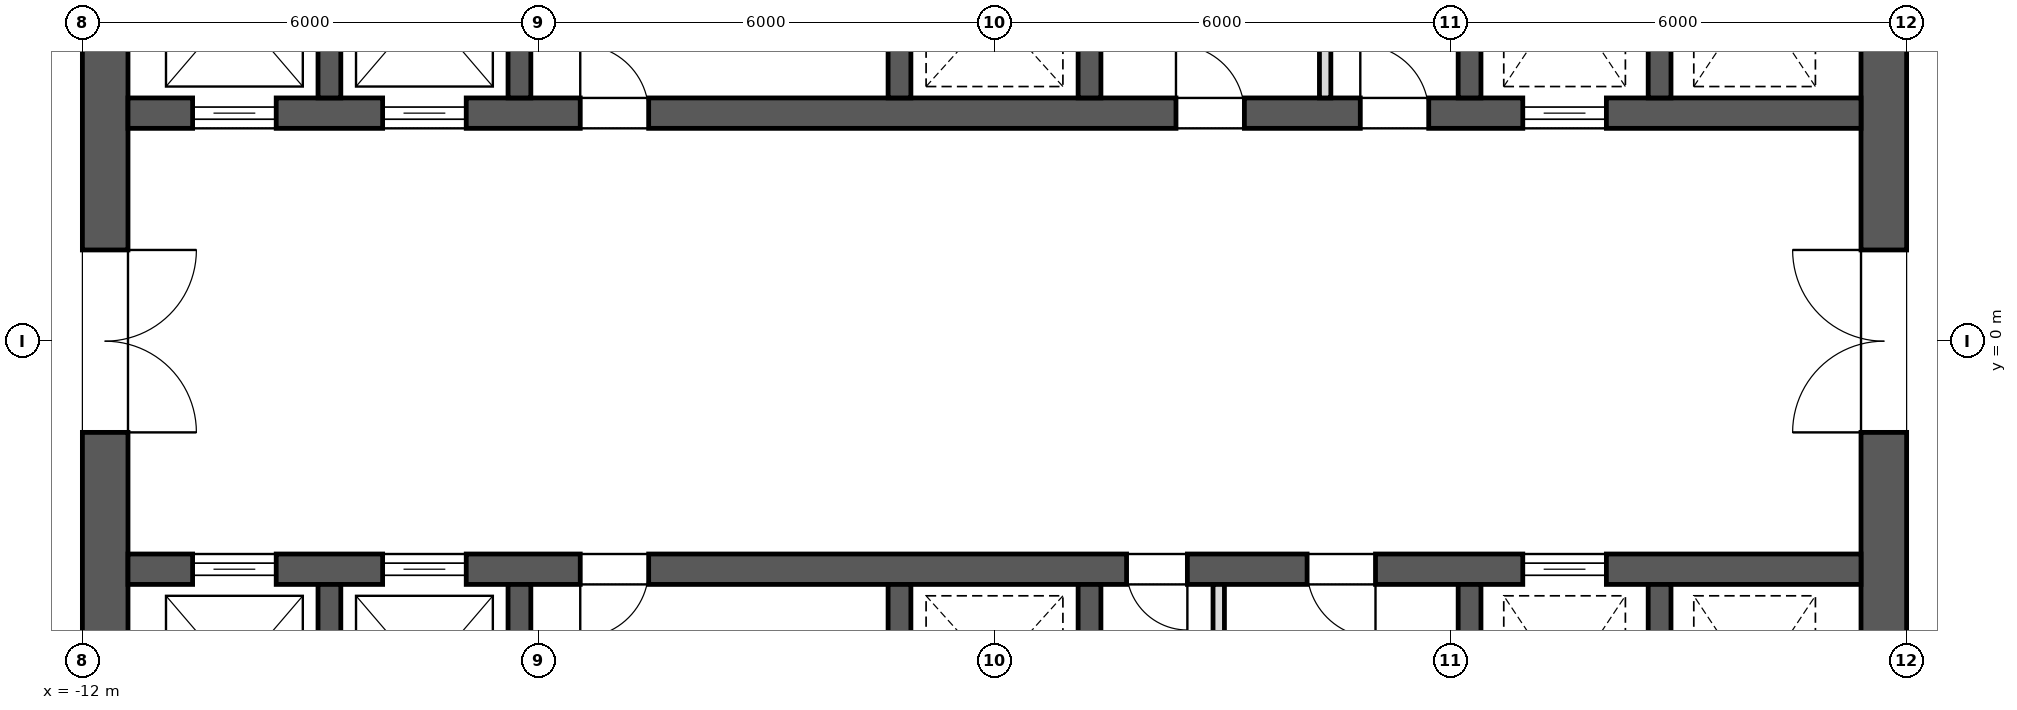
"""IFC4 building model, lengths in metres.
Left out: names, types, materials, properties, quantities, classifications, styles, units other than length and angle.
Written with IfcOpenShell. Run it as: python <this file> out.ifc"""

import sys

from ifc_helpers import new_model, si_unit, direction, frame, frame_2d, origin, place, context, subcontext, project, spatial, rectangle, extrude, element, fill, save


model = new_model("IFC4")
c1 = context("Model", 3, precision=1e-05, world=origin(), true_north=direction((0.0, 1.0)))
c2 = subcontext(c1, "Body", "Model", "MODEL_VIEW")
j1 = project(units=[si_unit("LENGTHUNIT", "METRE"), si_unit("PLANEANGLEUNIT", "RADIAN")], contexts=[c1])
p1 = place(None, origin())
s1 = spatial("IfcSite", under=j1, at=p1, CompositionType="ELEMENT")
p2 = place(p1, origin())
s2 = spatial("IfcBuilding", under=s1, at=p2, CompositionType="ELEMENT")
p3 = place(p2, frame((0.0, 0.0, 300.3)))
s3 = spatial("IfcBuildingStorey", under=s2, at=p3, CompositionType="ELEMENT", Elevation=300.3)
p4 = place(p3, frame((11.7, -11.4, 0.0), z_axis=(0.0, 0.0, 1.0), x_axis=(0.0, 1.0, 0.0)))
e1 = element("IfcWall", 1, at=p4, inside=s3, PredefinedType="SHEAR", context=c2, shape_type="SweptSolid", body=[
    extrude(rectangle(XDim=22.8, YDim=0.6, at=frame_2d((11.4, 0.0))), origin(), (0.0, 0.0, 1.0), 4.0),
])
p5 = place(p4, frame((10.2, 0.0, 0.0)))
e2 = element("IfcOpeningElement", 2, at=p5, cuts=e1, PredefinedType="OPENING", context=c2, shape_type="SweptSolid", body=[
    extrude(rectangle(XDim=2.4, YDim=2.1, at=frame_2d((1.2, 1.05))), frame((0.0, 0.312, 0.0), z_axis=(0.0, -1.0, 0.0), x_axis=(1.0, 0.0, 0.0)), (0.0, 0.0, 1.0), 0.624),
])
p6 = place(p4, frame((19.5, 0.0, 0.0)))
e3 = element("IfcOpeningElement", 3, at=p6, cuts=e1, PredefinedType="OPENING", context=c2, shape_type="SweptSolid", body=[
    extrude(rectangle(XDim=1.2, YDim=2.1, at=frame_2d((0.6, 1.05))), frame((0.0, 0.312, 0.0), z_axis=(0.0, -1.0, 0.0), x_axis=(1.0, 0.0, 0.0)), (0.0, 0.0, 1.0), 0.624),
])
p7 = place(p4, frame((2.1, 0.0, 0.0)))
e4 = element("IfcOpeningElement", 4, at=p7, cuts=e1, PredefinedType="OPENING", context=c2, shape_type="SweptSolid", body=[
    extrude(rectangle(XDim=1.2, YDim=2.1, at=frame_2d((0.6, 1.05))), frame((0.0, 0.312, 0.0), z_axis=(0.0, -1.0, 0.0), x_axis=(1.0, 0.0, 0.0)), (0.0, 0.0, 1.0), 0.624),
])
p8 = place(p3, frame((-11.7, -11.4, 0.0), z_axis=(0.0, 0.0, 1.0), x_axis=(0.0, 1.0, 0.0)))
e5 = element("IfcWall", 5, at=p8, inside=s3, PredefinedType="SHEAR", context=c2, shape_type="SweptSolid", body=[
    extrude(rectangle(XDim=22.8, YDim=0.6, at=frame_2d((11.4, 0.0))), origin(), (0.0, 0.0, 1.0), 4.0),
])
p9 = place(p8, frame((10.2, 0.0, 0.0)))
e6 = element("IfcOpeningElement", 6, at=p9, cuts=e5, PredefinedType="OPENING", context=c2, shape_type="SweptSolid", body=[
    extrude(rectangle(XDim=2.4, YDim=2.1, at=frame_2d((1.2, 1.05))), frame((0.0, 0.312, 0.0), z_axis=(0.0, -1.0, 0.0), x_axis=(1.0, 0.0, 0.0)), (0.0, 0.0, 1.0), 0.624),
])
p10 = place(p8, frame((18.925, 0.0, 0.0)))
e7 = element("IfcOpeningElement", 7, at=p10, cuts=e5, PredefinedType="OPENING", context=c2, shape_type="SweptSolid", body=[
    extrude(rectangle(XDim=1.2, YDim=2.1, at=frame_2d((0.6, 1.05))), frame((0.0, 0.312, 0.0), z_axis=(0.0, -1.0, 0.0), x_axis=(1.0, 0.0, 0.0)), (0.0, 0.0, 1.0), 0.624),
])
p11 = place(p8, frame((2.675, 0.0, 0.0)))
e8 = element("IfcOpeningElement", 8, at=p11, cuts=e5, PredefinedType="OPENING", context=c2, shape_type="SweptSolid", body=[
    extrude(rectangle(XDim=1.2, YDim=2.1, at=frame_2d((0.6, 1.05))), frame((0.0, 0.312, 0.0), z_axis=(0.0, -1.0, 0.0), x_axis=(1.0, 0.0, 0.0)), (0.0, 0.0, 1.0), 0.624),
])
p12 = place(p3, frame((-11.4, 3.0, 0.0), z_axis=(0.0, 0.0, 1.0), x_axis=(1.0, 0.0, 0.0)))
e9 = element("IfcWall", 9, at=p12, inside=s3, PredefinedType="SHEAR", context=c2, shape_type="SweptSolid", body=[
    extrude(rectangle(XDim=22.8, YDim=0.4, at=frame_2d((11.4, 0.0))), origin(), (0.0, 0.0, 1.0), 4.0),
])
p13 = place(p12, frame((0.85, 0.0, 0.0)))
e10 = element("IfcOpeningElement", 10, at=p13, cuts=e9, PredefinedType="OPENING", context=c2, shape_type="SweptSolid", body=[
    extrude(rectangle(XDim=1.1, YDim=2.1, at=frame_2d((0.55, 1.05))), frame((0.0, 0.212, 0.0), z_axis=(0.0, -1.0, 0.0), x_axis=(1.0, 0.0, 0.0)), (0.0, 0.0, 1.0), 0.424),
])
p14 = place(p12, frame((3.35, 0.0, 0.0)))
e11 = element("IfcOpeningElement", 11, at=p14, cuts=e9, PredefinedType="OPENING", context=c2, shape_type="SweptSolid", body=[
    extrude(rectangle(XDim=1.1, YDim=2.1, at=frame_2d((0.55, 1.05))), frame((0.0, 0.212, 0.0), z_axis=(0.0, -1.0, 0.0), x_axis=(1.0, 0.0, 0.0)), (0.0, 0.0, 1.0), 0.424),
])
p15 = place(p12, frame((18.35, 0.0, 0.0)))
e12 = element("IfcOpeningElement", 12, at=p15, cuts=e9, PredefinedType="OPENING", context=c2, shape_type="SweptSolid", body=[
    extrude(rectangle(XDim=1.1, YDim=2.1, at=frame_2d((0.55, 1.05))), frame((0.0, 0.212, 0.0), z_axis=(0.0, -1.0, 0.0), x_axis=(1.0, 0.0, 0.0)), (0.0, 0.0, 1.0), 0.424),
])
p16 = place(p12, frame((13.788, 0.0, 0.0)))
e13 = element("IfcOpeningElement", 13, at=p16, cuts=e9, PredefinedType="OPENING", context=c2, shape_type="SweptSolid", body=[
    extrude(rectangle(XDim=0.9, YDim=2.1, at=frame_2d((0.45, 1.05))), frame((0.0, 0.212, 0.0), z_axis=(0.0, -1.0, 0.0), x_axis=(1.0, 0.0, 0.0)), (0.0, 0.0, 1.0), 0.424),
])
p17 = place(p12, frame((16.212, 0.0, 0.0)))
e14 = element("IfcOpeningElement", 14, at=p17, cuts=e9, PredefinedType="OPENING", context=c2, shape_type="SweptSolid", body=[
    extrude(rectangle(XDim=0.9, YDim=2.1, at=frame_2d((0.45, 1.05))), frame((0.0, 0.212, 0.0), z_axis=(0.0, -1.0, 0.0), x_axis=(1.0, 0.0, 0.0)), (0.0, 0.0, 1.0), 0.424),
])
p18 = place(p12, frame((5.95, 0.0, 0.0)))
e15 = element("IfcOpeningElement", 15, at=p18, cuts=e9, PredefinedType="OPENING", context=c2, shape_type="SweptSolid", body=[
    extrude(rectangle(XDim=0.9, YDim=2.1, at=frame_2d((0.45, 1.05))), frame((0.0, 0.212, 0.0), z_axis=(0.0, -1.0, 0.0), x_axis=(1.0, 0.0, 0.0)), (0.0, 0.0, 1.0), 0.424),
])
for number, where, z_axis, x_axis in (
    (16, (-8.75, 3.2, 0.0), (0.0, 0.0, 1.0), (0.0, 1.0, 0.0)),
    (17, (-6.25, 3.2, 0.0), (0.0, 0.0, 1.0), (0.0, 1.0, 0.0)),
    (18, (-1.25, 3.2, 0.0), (0.0, 0.0, 1.0), (0.0, 1.0, 0.0)),
    (19, (1.25, 3.2, 0.0), (0.0, 0.0, 1.0), (0.0, 1.0, 0.0)),
    (20, (6.25, 3.2, 0.0), (0.0, 0.0, 1.0), (0.0, 1.0, 0.0)),
    (21, (8.75, 3.2, 0.0), (0.0, 0.0, 1.0), (0.0, 1.0, 0.0)),
):
    element("IfcWall", number, at=place(p3, frame(where, z_axis=z_axis, x_axis=x_axis)), inside=s3, PredefinedType="SHEAR", context=c2, shape_type="SweptSolid", body=[
        extrude(rectangle(XDim=2.9, YDim=0.3, at=frame_2d((1.45, 0.0))), origin(), (0.0, 0.0, 1.0), 4.0),
    ])
p19 = place(p3, frame((-11.4, -3.0, 0.0), z_axis=(0.0, 0.0, 1.0), x_axis=(1.0, 0.0, 0.0)))
e22 = element("IfcWall", 22, at=p19, inside=s3, PredefinedType="SHEAR", context=c2, shape_type="SweptSolid", body=[
    extrude(rectangle(XDim=22.8, YDim=0.4, at=frame_2d((11.4, 0.0))), origin(), (0.0, 0.0, 1.0), 4.0),
])
p20 = place(p19, frame((0.85, 0.0, 0.0)))
e23 = element("IfcOpeningElement", 23, at=p20, cuts=e22, PredefinedType="OPENING", context=c2, shape_type="SweptSolid", body=[
    extrude(rectangle(XDim=1.1, YDim=2.1, at=frame_2d((0.55, 1.05))), frame((0.0, 0.212, 0.0), z_axis=(0.0, -1.0, 0.0), x_axis=(1.0, 0.0, 0.0)), (0.0, 0.0, 1.0), 0.424),
])
p21 = place(p19, frame((3.35, 0.0, 0.0)))
e24 = element("IfcOpeningElement", 24, at=p21, cuts=e22, PredefinedType="OPENING", context=c2, shape_type="SweptSolid", body=[
    extrude(rectangle(XDim=1.1, YDim=2.1, at=frame_2d((0.55, 1.05))), frame((0.0, 0.212, 0.0), z_axis=(0.0, -1.0, 0.0), x_axis=(1.0, 0.0, 0.0)), (0.0, 0.0, 1.0), 0.424),
])
p22 = place(p19, frame((18.35, 0.0, 0.0)))
e25 = element("IfcOpeningElement", 25, at=p22, cuts=e22, PredefinedType="OPENING", context=c2, shape_type="SweptSolid", body=[
    extrude(rectangle(XDim=1.1, YDim=2.1, at=frame_2d((0.55, 1.05))), frame((0.0, 0.212, 0.0), z_axis=(0.0, -1.0, 0.0), x_axis=(1.0, 0.0, 0.0)), (0.0, 0.0, 1.0), 0.424),
])
p23 = place(p19, frame((13.137, 0.0, 0.0)))
e26 = element("IfcOpeningElement", 26, at=p23, cuts=e22, PredefinedType="OPENING", context=c2, shape_type="SweptSolid", body=[
    extrude(rectangle(XDim=0.8, YDim=2.1, at=frame_2d((0.4, 1.05))), frame((0.0, 0.212, 0.0), z_axis=(0.0, -1.0, 0.0), x_axis=(1.0, 0.0, 0.0)), (0.0, 0.0, 1.0), 0.424),
])
p24 = place(p19, frame((15.512, 0.0, 0.0)))
e27 = element("IfcOpeningElement", 27, at=p24, cuts=e22, PredefinedType="OPENING", context=c2, shape_type="SweptSolid", body=[
    extrude(rectangle(XDim=0.9, YDim=2.1, at=frame_2d((0.45, 1.05))), frame((0.0, 0.212, 0.0), z_axis=(0.0, -1.0, 0.0), x_axis=(1.0, 0.0, 0.0)), (0.0, 0.0, 1.0), 0.424),
])
p25 = place(p19, frame((5.95, 0.0, 0.0)))
e28 = element("IfcOpeningElement", 28, at=p25, cuts=e22, PredefinedType="OPENING", context=c2, shape_type="SweptSolid", body=[
    extrude(rectangle(XDim=0.9, YDim=2.1, at=frame_2d((0.45, 1.05))), frame((0.0, 0.212, 0.0), z_axis=(0.0, -1.0, 0.0), x_axis=(1.0, 0.0, 0.0)), (0.0, 0.0, 1.0), 0.424),
])
for number, where, z_axis, x_axis in (
    (29, (-8.75, -6.1, 0.0), (0.0, 0.0, 1.0), (0.0, 1.0, 0.0)),
    (30, (-6.25, -6.1, 0.0), (0.0, 0.0, 1.0), (0.0, 1.0, 0.0)),
    (31, (-1.25, -6.1, 0.0), (0.0, 0.0, 1.0), (0.0, 1.0, 0.0)),
    (32, (1.25, -6.1, 0.0), (0.0, 0.0, 1.0), (0.0, 1.0, 0.0)),
    (33, (6.25, -6.1, 0.0), (0.0, 0.0, 1.0), (0.0, 1.0, 0.0)),
    (34, (8.75, -6.1, 0.0), (0.0, 0.0, 1.0), (0.0, 1.0, 0.0)),
):
    element("IfcWall", number, at=place(p3, frame(where, z_axis=z_axis, x_axis=x_axis)), inside=s3, PredefinedType="SHEAR", context=c2, shape_type="SweptSolid", body=[
        extrude(rectangle(XDim=2.9, YDim=0.3, at=frame_2d((1.45, 0.0))), origin(), (0.0, 0.0, 1.0), 4.0),
    ])
for number, where, z_axis, x_axis in (
    (35, (4.35, 3.2, 0.0), (0.0, 0.0, 1.0), (0.0, 1.0, 0.0)),
    (36, (2.95, -6.1, 0.0), (0.0, 0.0, 1.0), (0.0, 1.0, 0.0)),
):
    element("IfcWall", number, at=place(p3, frame(where, z_axis=z_axis, x_axis=x_axis)), inside=s3, PredefinedType="PARTITIONING", context=c2, shape_type="SweptSolid", body=[
        extrude(rectangle(XDim=2.9, YDim=0.15, at=frame_2d((1.45, 0.0))), origin(), (0.0, 0.0, 1.0), 3.7),
    ])
p26 = place(p13, origin())
e37 = element("IfcDoor", 37, at=p26, inside=s3, OperationType="SLIDING_TO_LEFT", PredefinedType="DOOR", context=c2, shape_type="SweptSolid", body=[
    extrude(rectangle(XDim=1.1, YDim=2.1, at=frame_2d((0.55, 1.05))), frame((0.0, 0.025, 0.0), z_axis=(0.0, -1.0, 0.0), x_axis=(1.0, 0.0, 0.0)), (0.0, 0.0, 1.0), 0.05),
])
fill(e10, e37)
p27 = place(p14, origin())
e38 = element("IfcDoor", 38, at=p27, inside=s3, OperationType="SLIDING_TO_LEFT", PredefinedType="DOOR", context=c2, shape_type="SweptSolid", body=[
    extrude(rectangle(XDim=1.1, YDim=2.1, at=frame_2d((0.55, 1.05))), frame((0.0, 0.025, 0.0), z_axis=(0.0, -1.0, 0.0), x_axis=(1.0, 0.0, 0.0)), (0.0, 0.0, 1.0), 0.05),
])
fill(e11, e38)
p28 = place(p20, origin())
e39 = element("IfcDoor", 39, at=p28, inside=s3, OperationType="SLIDING_TO_LEFT", PredefinedType="DOOR", context=c2, shape_type="SweptSolid", body=[
    extrude(rectangle(XDim=1.1, YDim=2.1, at=frame_2d((0.55, 1.05))), frame((0.0, 0.025, 0.0), z_axis=(0.0, -1.0, 0.0), x_axis=(1.0, 0.0, 0.0)), (0.0, 0.0, 1.0), 0.05),
])
fill(e23, e39)
p29 = place(p21, origin())
e40 = element("IfcDoor", 40, at=p29, inside=s3, OperationType="SLIDING_TO_LEFT", PredefinedType="DOOR", context=c2, shape_type="SweptSolid", body=[
    extrude(rectangle(XDim=1.1, YDim=2.1, at=frame_2d((0.55, 1.05))), frame((0.0, 0.025, 0.0), z_axis=(0.0, -1.0, 0.0), x_axis=(1.0, 0.0, 0.0)), (0.0, 0.0, 1.0), 0.05),
])
fill(e24, e40)
p30 = place(p15, origin())
e41 = element("IfcDoor", 41, at=p30, inside=s3, OperationType="SLIDING_TO_LEFT", PredefinedType="DOOR", context=c2, shape_type="SweptSolid", body=[
    extrude(rectangle(XDim=1.1, YDim=2.1, at=frame_2d((0.55, 1.05))), frame((0.0, 0.025, 0.0), z_axis=(0.0, -1.0, 0.0), x_axis=(1.0, 0.0, 0.0)), (0.0, 0.0, 1.0), 0.05),
])
fill(e12, e41)
p31 = place(p22, origin())
e42 = element("IfcDoor", 42, at=p31, inside=s3, OperationType="SLIDING_TO_LEFT", PredefinedType="DOOR", context=c2, shape_type="SweptSolid", body=[
    extrude(rectangle(XDim=1.1, YDim=2.1, at=frame_2d((0.55, 1.05))), frame((0.0, 0.025, 0.0), z_axis=(0.0, -1.0, 0.0), x_axis=(1.0, 0.0, 0.0)), (0.0, 0.0, 1.0), 0.05),
])
fill(e25, e42)
p32 = place(p9, frame((2.4, 0.0, 0.0), z_axis=(0.0, 0.0, 1.0), x_axis=(-1.0, 0.0, 0.0)))
e43 = element("IfcDoor", 43, at=p32, inside=s3, OperationType="DOUBLE_DOOR_SINGLE_SWING", PredefinedType="DOOR", context=c2, shape_type="SweptSolid", body=[
    extrude(rectangle(XDim=2.4, YDim=2.1, at=frame_2d((1.2, 1.05))), frame((0.0, 0.025, 0.0), z_axis=(0.0, -1.0, 0.0), x_axis=(1.0, 0.0, 0.0)), (0.0, 0.0, 1.0), 0.05),
])
fill(e6, e43)
p33 = place(p5, origin())
e44 = element("IfcDoor", 44, at=p33, inside=s3, OperationType="DOUBLE_DOOR_SINGLE_SWING", PredefinedType="DOOR", context=c2, shape_type="SweptSolid", body=[
    extrude(rectangle(XDim=2.4, YDim=2.1, at=frame_2d((1.2, 1.05))), frame((0.0, 0.025, 0.0), z_axis=(0.0, -1.0, 0.0), x_axis=(1.0, 0.0, 0.0)), (0.0, 0.0, 1.0), 0.05),
])
fill(e2, e44)
p34 = place(p16, origin())
e45 = element("IfcDoor", 45, at=p34, inside=s3, OperationType="SINGLE_SWING_RIGHT", PredefinedType="DOOR", context=c2, shape_type="SweptSolid", body=[
    extrude(rectangle(XDim=0.9, YDim=2.1, at=frame_2d((0.45, 1.05))), frame((0.0, 0.025, 0.0), z_axis=(0.0, -1.0, 0.0), x_axis=(1.0, 0.0, 0.0)), (0.0, 0.0, 1.0), 0.05),
])
fill(e13, e45)
p35 = place(p17, origin())
e46 = element("IfcDoor", 46, at=p35, inside=s3, OperationType="SINGLE_SWING_RIGHT", PredefinedType="DOOR", context=c2, shape_type="SweptSolid", body=[
    extrude(rectangle(XDim=0.9, YDim=2.1, at=frame_2d((0.45, 1.05))), frame((0.0, 0.025, 0.0), z_axis=(0.0, -1.0, 0.0), x_axis=(1.0, 0.0, 0.0)), (0.0, 0.0, 1.0), 0.05),
])
fill(e14, e46)
p36 = place(p18, origin())
e47 = element("IfcDoor", 47, at=p36, inside=s3, OperationType="SINGLE_SWING_RIGHT", PredefinedType="DOOR", context=c2, shape_type="SweptSolid", body=[
    extrude(rectangle(XDim=0.9, YDim=2.1, at=frame_2d((0.45, 1.05))), frame((0.0, 0.025, 0.0), z_axis=(0.0, -1.0, 0.0), x_axis=(1.0, 0.0, 0.0)), (0.0, 0.0, 1.0), 0.05),
])
fill(e15, e47)
p37 = place(p23, frame((0.8, 0.0, 0.0), z_axis=(0.0, 0.0, 1.0), x_axis=(-1.0, 0.0, 0.0)))
e48 = element("IfcDoor", 48, at=p37, inside=s3, OperationType="SINGLE_SWING_RIGHT", PredefinedType="DOOR", context=c2, shape_type="SweptSolid", body=[
    extrude(rectangle(XDim=0.8, YDim=2.1, at=frame_2d((0.4, 1.05))), frame((0.0, 0.025, 0.0), z_axis=(0.0, -1.0, 0.0), x_axis=(1.0, 0.0, 0.0)), (0.0, 0.0, 1.0), 0.05),
])
fill(e26, e48)
p38 = place(p24, frame((0.9, 0.0, 0.0), z_axis=(0.0, 0.0, 1.0), x_axis=(-1.0, 0.0, 0.0)))
e49 = element("IfcDoor", 49, at=p38, inside=s3, OperationType="SINGLE_SWING_RIGHT", PredefinedType="DOOR", context=c2, shape_type="SweptSolid", body=[
    extrude(rectangle(XDim=0.9, YDim=2.1, at=frame_2d((0.45, 1.05))), frame((0.0, 0.025, 0.0), z_axis=(0.0, -1.0, 0.0), x_axis=(1.0, 0.0, 0.0)), (0.0, 0.0, 1.0), 0.05),
])
fill(e27, e49)
p39 = place(p25, frame((0.9, 0.0, 0.0), z_axis=(0.0, 0.0, 1.0), x_axis=(-1.0, 0.0, 0.0)))
e50 = element("IfcDoor", 50, at=p39, inside=s3, OperationType="SINGLE_SWING_LEFT", PredefinedType="DOOR", context=c2, shape_type="SweptSolid", body=[
    extrude(rectangle(XDim=0.9, YDim=2.1, at=frame_2d((0.45, 1.05))), frame((0.0, 0.025, 0.0), z_axis=(0.0, -1.0, 0.0), x_axis=(1.0, 0.0, 0.0)), (0.0, 0.0, 1.0), 0.05),
])
fill(e28, e50)
save(model, sys.argv[1])
